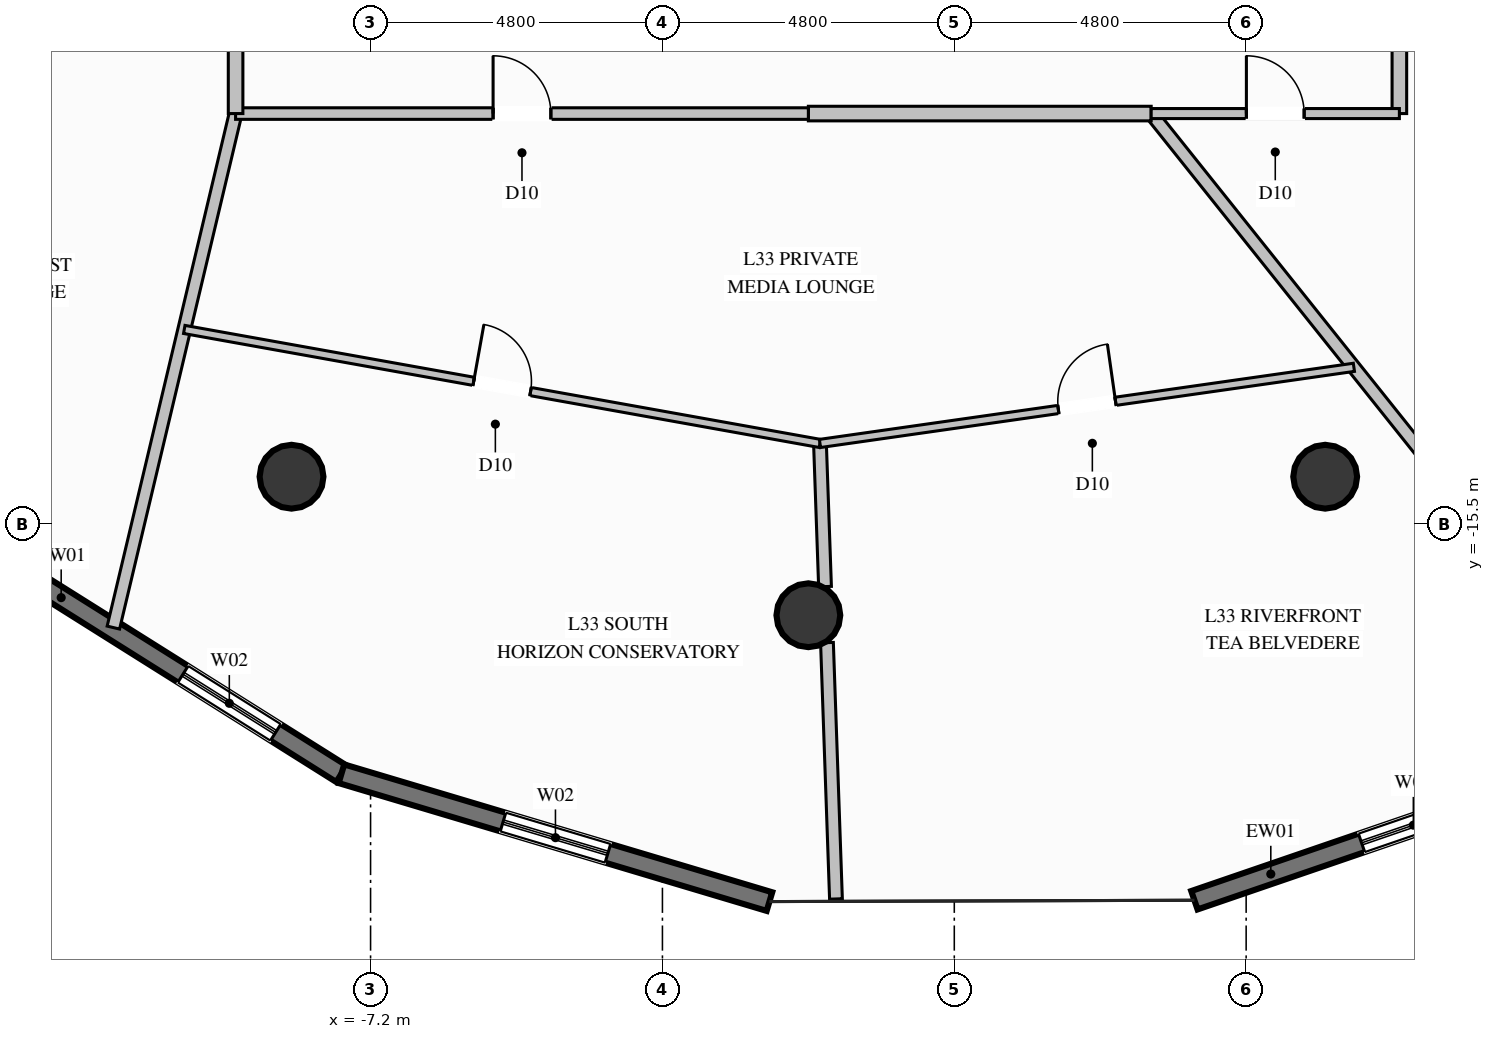
"""IFC4 building model, lengths in metres.
Left out: names, types, materials, properties, quantities, classifications, styles, units other than length and angle.
Written with IfcOpenShell. Run it as: python <this file> out.ifc"""

import sys

from ifc_helpers import new_model, si_unit, direction, frame, frame_2d, origin, origin_2d, place, context, subcontext, project, spatial, rectangle, circle, extrude, element, fill, save


model = new_model("IFC4")
c1 = context("Model", 3, precision=1e-05, world=origin(), true_north=direction((0.0, 1.0)))
c2 = subcontext(c1, "Body", "Model", "MODEL_VIEW")
j1 = project(units=[si_unit("LENGTHUNIT", "METRE"), si_unit("PLANEANGLEUNIT", "RADIAN")], contexts=[c1])
p1 = place(None, origin())
s1 = spatial("IfcSite", under=j1, at=p1, CompositionType="ELEMENT")
p2 = place(p1, origin())
s2 = spatial("IfcBuilding", under=s1, at=p2, CompositionType="ELEMENT")
p3 = place(p2, frame((0.0, 0.0, 131.4)))
s3 = spatial("IfcBuildingStorey", under=s2, at=p3, CompositionType="ELEMENT", Elevation=131.4)
for number, where, z_axis, x_axis in (
    (1, (-8.5, -14.722, 0.0), (0.0, 0.0, 1.0), (1.0, 0.0, 0.0)),
    (2, (0.0, -17.0, 0.0), (0.0, 0.0, 1.0), (1.0, 0.0, 0.0)),
    (3, (8.5, -14.722, 0.0), (0.0, 0.0, 1.0), (1.0, 0.0, 0.0)),
):
    element("IfcColumn", number, at=place(p3, frame(where, z_axis=z_axis, x_axis=x_axis)), inside=s3, PredefinedType="COLUMN", context=c2, shape_type="SweptSolid", body=[
        extrude(circle(Radius=0.525, at=origin_2d()), origin(), (0.0, 0.0, 1.0), 3.6),
    ])
p4 = place(p3, frame((-7.679, -19.607, 0.0), z_axis=(0.0, 0.0, 1.0), x_axis=(-0.84673132195, 0.5320207406, 0.0)))
e4 = element("IfcWall", 4, at=p4, inside=s3, PredefinedType="SOLIDWALL", context=c2, shape_type="SweptSolid", body=[
    extrude(rectangle(XDim=7.56, YDim=0.32, at=frame_2d((3.78, 0.0))), origin(), (0.0, 0.0, 1.0), 3.35),
])
p5 = place(p4, frame((1.278, 0.0, 0.35)))
e5 = element("IfcOpeningElement", 5, at=p5, cuts=e4, PredefinedType="OPENING", context=c2, shape_type="SweptSolid", body=[
    extrude(rectangle(XDim=1.8, YDim=2.6, at=frame_2d((0.9, 1.3))), frame((0.0, 0.17, 0.0), z_axis=(0.0, -1.0, 0.0), x_axis=(1.0, 0.0, 0.0)), (0.0, 0.0, 1.0), 0.34),
])
p6 = place(p3, frame((-0.64, -21.709, 0.0), z_axis=(0.0, 0.0, 1.0), x_axis=(-0.958187738701, 0.286140275743, 0.0)))
e6 = element("IfcWall", 6, at=p6, inside=s3, PredefinedType="SOLIDWALL", context=c2, shape_type="SweptSolid", body=[
    extrude(rectangle(XDim=7.346, YDim=0.32, at=frame_2d((3.673, 0.0))), origin(), (0.0, 0.0, 1.0), 3.35),
])
p7 = place(p6, frame((2.773, 0.0, 0.35)))
e7 = element("IfcOpeningElement", 7, at=p7, cuts=e6, PredefinedType="OPENING", context=c2, shape_type="SweptSolid", body=[
    extrude(rectangle(XDim=1.8, YDim=2.6, at=frame_2d((0.9, 1.3))), frame((0.0, 0.17, 0.0), z_axis=(0.0, -1.0, 0.0), x_axis=(1.0, 0.0, 0.0)), (0.0, 0.0, 1.0), 0.34),
])
p8 = place(p3, frame((12.604, -19.542, 0.0), z_axis=(0.0, 0.0, 1.0), x_axis=(-0.945923289235, -0.324390398877, 0.0)))
e8 = element("IfcWall", 8, at=p8, inside=s3, PredefinedType="SOLIDWALL", context=c2, shape_type="SweptSolid", body=[
    extrude(rectangle(XDim=6.613, YDim=0.32, at=frame_2d((3.306, 0.0))), origin(), (0.0, 0.0, 1.0), 3.35),
])
p9 = place(p8, frame((1.906, 0.0, 0.35)))
e9 = element("IfcOpeningElement", 9, at=p9, cuts=e8, PredefinedType="OPENING", context=c2, shape_type="SweptSolid", body=[
    extrude(rectangle(XDim=1.8, YDim=2.6, at=frame_2d((0.9, 1.3))), frame((0.0, 0.17, 0.0), z_axis=(0.0, -1.0, 0.0), x_axis=(1.0, 0.0, 0.0)), (0.0, 0.0, 1.0), 0.34),
])
p10 = place(p3, frame((-9.42, -5.325, 0.0), z_axis=(0.0, 0.0, 1.0), x_axis=(-0.861378052692, -0.507964418381, 0.0)))
e10 = element("IfcWall", 10, at=p10, inside=s3, PredefinedType="PARTITIONING", context=c2, shape_type="SweptSolid", body=[
    extrude(rectangle(XDim=5.636, YDim=0.21, at=frame_2d((2.818, 0.0))), origin(), (0.0, 0.0, 1.0), 2.791),
])
p11 = place(p3, frame((9.72, -5.325, 0.0), z_axis=(0.0, 0.0, 1.0), x_axis=(0.855199655735, -0.518298706183, 0.0)))
e11 = element("IfcWall", 11, at=p11, inside=s3, PredefinedType="PARTITIONING", context=c2, shape_type="SweptSolid", body=[
    extrude(rectangle(XDim=5.393, YDim=0.21, at=frame_2d((2.697, 0.0))), origin(), (0.0, 0.0, 1.0), 2.791),
])
p12 = place(p3, frame((5.638, -8.75, 0.0), z_axis=(0.0, 0.0, 1.0), x_axis=(0.624175182261, -0.781284418025, 0.0)))
e12 = element("IfcWall", 12, at=p12, inside=s3, PredefinedType="PARTITIONING", context=c2, shape_type="SweptSolid", body=[
    extrude(rectangle(XDim=12.718, YDim=0.21, at=frame_2d((6.359, 0.0))), origin(), (0.0, 0.0, 1.0), 3.35),
])
p13 = place(p3, frame((-9.42, -8.75, 0.0), z_axis=(0.0, 0.0, 1.0), x_axis=(-0.231339406626, -0.972873105262, 0.0)))
e13 = element("IfcWall", 13, at=p13, inside=s3, PredefinedType="PARTITIONING", context=c2, shape_type="SweptSolid", body=[
    extrude(rectangle(XDim=8.688, YDim=0.21, at=frame_2d((4.344, 0.0))), origin(), (0.0, 0.0, 1.0), 3.35),
])
p14 = place(p3, frame((0.0, -8.75, 0.0), z_axis=(0.0, 0.0, 1.0), x_axis=(1.0, 0.0, 0.0)))
e14 = element("IfcWall", 14, at=p14, inside=s3, PredefinedType="PARTITIONING", context=c2, shape_type="SweptSolid", body=[
    extrude(rectangle(XDim=5.638, YDim=0.24, at=frame_2d((2.819, 0.0))), origin(), (0.0, 0.0, 1.0), 3.35),
])
p15 = place(p3, frame((-9.42, -8.75, 0.0), z_axis=(0.0, 0.0, 1.0), x_axis=(1.0, 0.0, 0.0)))
e15 = element("IfcWall", 15, at=p15, inside=s3, PredefinedType="PARTITIONING", context=c2, shape_type="SweptSolid", body=[
    extrude(rectangle(XDim=9.42, YDim=0.19, at=frame_2d((4.71, 0.0))), origin(), (0.0, 0.0, 1.0), 3.35),
])
p16 = place(p15, frame((4.235, 0.0, 0.0)))
e16 = element("IfcOpeningElement", 16, at=p16, cuts=e15, PredefinedType="OPENING", context=c2, shape_type="SweptSolid", body=[
    extrude(rectangle(XDim=0.95, YDim=2.1, at=frame_2d((0.475, 1.05))), frame((0.0, 0.105, 0.0), z_axis=(0.0, -1.0, 0.0), x_axis=(1.0, 0.0, 0.0)), (0.0, 0.0, 1.0), 0.21),
])
p17 = place(p3, frame((-9.42, -5.325, 0.0), z_axis=(0.0, 0.0, 1.0), x_axis=(0.0, -1.0, 0.0)))
e17 = element("IfcWall", 17, at=p17, inside=s3, PredefinedType="PARTITIONING", context=c2, shape_type="SweptSolid", body=[
    extrude(rectangle(XDim=3.425, YDim=0.24, at=frame_2d((1.712, 0.0))), origin(), (0.0, 0.0, 1.0), 3.35),
])
p18 = place(p17, frame((1.212, 0.0, 0.0)))
e18 = element("IfcOpeningElement", 18, at=p18, cuts=e17, PredefinedType="OPENING", context=c2, shape_type="SweptSolid", body=[
    extrude(rectangle(XDim=1.0, YDim=2.2, at=frame_2d((0.5, 1.1))), frame((0.0, 0.13, 0.0), z_axis=(0.0, -1.0, 0.0), x_axis=(1.0, 0.0, 0.0)), (0.0, 0.0, 1.0), 0.26),
])
p19 = place(p3, frame((0.191, -14.175, 0.0), z_axis=(0.0, 0.0, 1.0), x_axis=(0.035240490846, -0.999378860996, 0.0)))
e19 = element("IfcWall", 19, at=p19, inside=s3, PredefinedType="PARTITIONING", context=c2, shape_type="SweptSolid", body=[
    extrude(rectangle(XDim=2.355, YDim=0.21, at=frame_2d((1.178, 0.0))), origin(), (0.0, 0.0, 1.0), 3.35),
])
p20 = place(p3, frame((0.306, -17.451, 0.0), z_axis=(0.0, 0.0, 1.0), x_axis=(0.035136125061, -0.999382535727, 0.0)))
e20 = element("IfcWall", 20, at=p20, inside=s3, PredefinedType="PARTITIONING", context=c2, shape_type="SweptSolid", body=[
    extrude(rectangle(XDim=4.218, YDim=0.21, at=frame_2d((2.109, 0.0))), origin(), (0.0, 0.0, 1.0), 3.35),
])
p21 = place(p3, frame((-10.264, -12.3, 0.0), z_axis=(0.0, 0.0, 1.0), x_axis=(0.984295895502, -0.176526457218, 0.0)))
e21 = element("IfcWall", 21, at=p21, inside=s3, PredefinedType="PARTITIONING", context=c2, shape_type="SweptSolid", body=[
    extrude(rectangle(XDim=10.622, YDim=0.135, at=frame_2d((5.311, 0.0))), origin(), (0.0, 0.0, 1.0), 3.35),
])
p22 = place(p21, frame((4.836, 0.0, 0.0)))
e22 = element("IfcOpeningElement", 22, at=p22, cuts=e21, PredefinedType="OPENING", context=c2, shape_type="SweptSolid", body=[
    extrude(rectangle(XDim=0.95, YDim=2.1, at=frame_2d((0.475, 1.05))), frame((0.0, 0.078, 0.0), z_axis=(0.0, -1.0, 0.0), x_axis=(1.0, 0.0, 0.0)), (0.0, 0.0, 1.0), 0.155),
])
p23 = place(p3, frame((0.191, -14.175, 0.0), z_axis=(0.0, 0.0, 1.0), x_axis=(0.98998854123, 0.141147753202, 0.0)))
e23 = element("IfcWall", 23, at=p23, inside=s3, PredefinedType="PARTITIONING", context=c2, shape_type="SweptSolid", body=[
    extrude(rectangle(XDim=8.87, YDim=0.135, at=frame_2d((4.435, 0.0))), origin(), (0.0, 0.0, 1.0), 3.35),
])
p24 = place(p23, frame((3.96, 0.0, 0.0)))
e24 = element("IfcOpeningElement", 24, at=p24, cuts=e23, PredefinedType="OPENING", context=c2, shape_type="SweptSolid", body=[
    extrude(rectangle(XDim=0.95, YDim=2.1, at=frame_2d((0.475, 1.05))), frame((0.0, 0.078, 0.0), z_axis=(0.0, -1.0, 0.0), x_axis=(1.0, 0.0, 0.0)), (0.0, 0.0, 1.0), 0.155),
])
p25 = place(p3, frame((9.72, -8.75, 0.0), z_axis=(0.0, 0.0, 1.0), x_axis=(0.0, 1.0, 0.0)))
e25 = element("IfcWall", 25, at=p25, inside=s3, PredefinedType="PARTITIONING", context=c2, shape_type="SweptSolid", body=[
    extrude(rectangle(XDim=3.425, YDim=0.24, at=frame_2d((1.712, 0.0))), origin(), (0.0, 0.0, 1.0), 3.35),
])
p26 = place(p3, frame((5.638, -8.75, 0.0), z_axis=(0.0, 0.0, 1.0), x_axis=(1.0, 0.0, 0.0)))
e26 = element("IfcWall", 26, at=p26, inside=s3, PredefinedType="PARTITIONING", context=c2, shape_type="SweptSolid", body=[
    extrude(rectangle(XDim=4.082, YDim=0.165, at=frame_2d((2.041, 0.0))), origin(), (0.0, 0.0, 1.0), 3.35),
])
p27 = place(p26, frame((1.566, 0.0, 0.0)))
e27 = element("IfcOpeningElement", 27, at=p27, cuts=e26, PredefinedType="OPENING", context=c2, shape_type="SweptSolid", body=[
    extrude(rectangle(XDim=0.95, YDim=2.1, at=frame_2d((0.475, 1.05))), frame((0.0, 0.093, 0.0), z_axis=(0.0, -1.0, 0.0), x_axis=(1.0, 0.0, 0.0)), (0.0, 0.0, 1.0), 0.185),
])
p28 = place(p5, origin())
e28 = element("IfcWindow", 28, at=p28, inside=s3, PartitioningType="SINGLE_PANEL", PredefinedType="WINDOW", context=c2, shape_type="SweptSolid", body=[
    extrude(rectangle(XDim=1.8, YDim=2.6, at=frame_2d((0.9, 1.3))), frame((0.0, 0.03, 0.0), z_axis=(0.0, -1.0, 0.0), x_axis=(1.0, 0.0, 0.0)), (0.0, 0.0, 1.0), 0.06),
])
fill(e5, e28)
p29 = place(p7, origin())
e29 = element("IfcWindow", 29, at=p29, inside=s3, PartitioningType="SINGLE_PANEL", PredefinedType="WINDOW", context=c2, shape_type="SweptSolid", body=[
    extrude(rectangle(XDim=1.8, YDim=2.6, at=frame_2d((0.9, 1.3))), frame((0.0, 0.03, 0.0), z_axis=(0.0, -1.0, 0.0), x_axis=(1.0, 0.0, 0.0)), (0.0, 0.0, 1.0), 0.06),
])
fill(e7, e29)
p30 = place(p9, origin())
e30 = element("IfcWindow", 30, at=p30, inside=s3, PartitioningType="SINGLE_PANEL", PredefinedType="WINDOW", context=c2, shape_type="SweptSolid", body=[
    extrude(rectangle(XDim=1.8, YDim=2.6, at=frame_2d((0.9, 1.3))), frame((0.0, 0.03, 0.0), z_axis=(0.0, -1.0, 0.0), x_axis=(1.0, 0.0, 0.0)), (0.0, 0.0, 1.0), 0.06),
])
fill(e9, e30)
p31 = place(p16, origin())
e31 = element("IfcDoor", 31, at=p31, inside=s3, OperationType="SINGLE_SWING_LEFT", PredefinedType="DOOR", context=c2, shape_type="SweptSolid", body=[
    extrude(rectangle(XDim=0.95, YDim=2.1, at=frame_2d((0.475, 1.05))), frame((0.0, 0.025, 0.0), z_axis=(0.0, -1.0, 0.0), x_axis=(1.0, 0.0, 0.0)), (0.0, 0.0, 1.0), 0.05),
])
fill(e16, e31)
p32 = place(p22, origin())
e32 = element("IfcDoor", 32, at=p32, inside=s3, OperationType="SINGLE_SWING_LEFT", PredefinedType="DOOR", context=c2, shape_type="SweptSolid", body=[
    extrude(rectangle(XDim=0.95, YDim=2.1, at=frame_2d((0.475, 1.05))), frame((0.0, 0.025, 0.0), z_axis=(0.0, -1.0, 0.0), x_axis=(1.0, 0.0, 0.0)), (0.0, 0.0, 1.0), 0.05),
])
fill(e22, e32)
p33 = place(p24, origin())
e33 = element("IfcDoor", 33, at=p33, inside=s3, OperationType="SINGLE_SWING_RIGHT", PredefinedType="DOOR", context=c2, shape_type="SweptSolid", body=[
    extrude(rectangle(XDim=0.95, YDim=2.1, at=frame_2d((0.475, 1.05))), frame((0.0, 0.025, 0.0), z_axis=(0.0, -1.0, 0.0), x_axis=(1.0, 0.0, 0.0)), (0.0, 0.0, 1.0), 0.05),
])
fill(e24, e33)
p34 = place(p27, origin())
e34 = element("IfcDoor", 34, at=p34, inside=s3, OperationType="SINGLE_SWING_LEFT", PredefinedType="DOOR", context=c2, shape_type="SweptSolid", body=[
    extrude(rectangle(XDim=0.95, YDim=2.1, at=frame_2d((0.475, 1.05))), frame((0.0, 0.025, 0.0), z_axis=(0.0, -1.0, 0.0), x_axis=(1.0, 0.0, 0.0)), (0.0, 0.0, 1.0), 0.05),
])
fill(e27, e34)
save(model, sys.argv[1])
